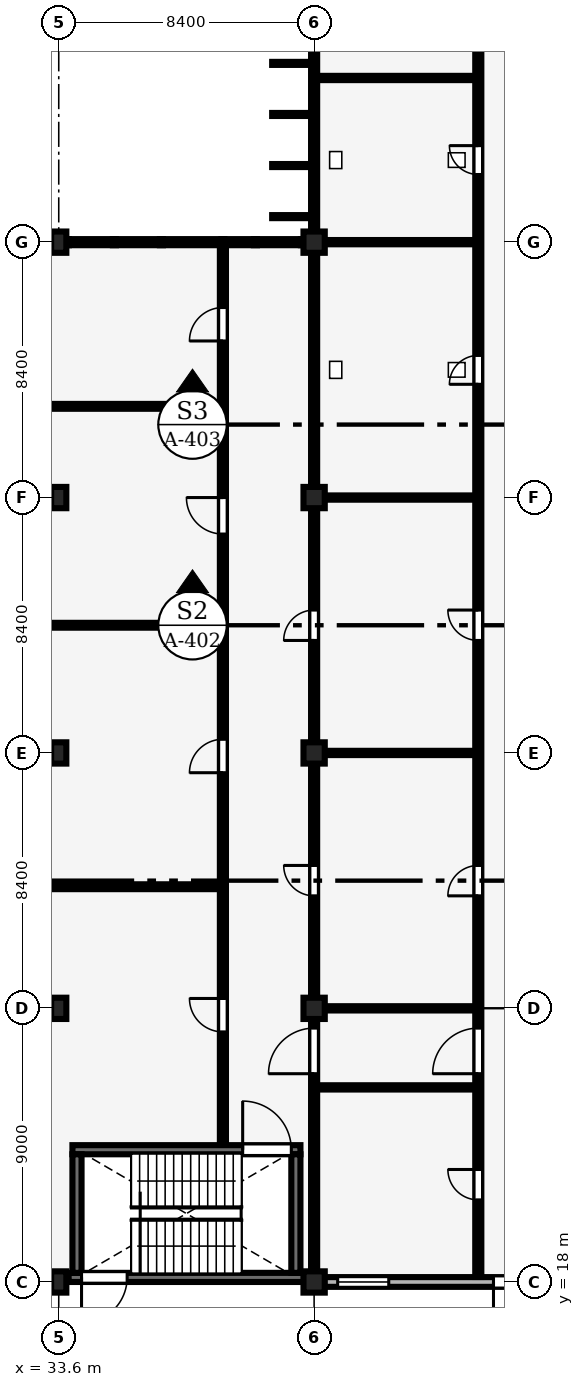
"""IFC4 building model, lengths in metres.
Left out: names, types, materials, properties, quantities, classifications, styles, units other than length and angle.
Written with IfcOpenShell. Run it as: python <this file> out.ifc"""

import sys

from ifc_helpers import new_model, si_unit, direction, frame, frame_2d, origin, origin_2d, place, context, subcontext, project, spatial, rectangle, extrude, element, fill, save


model = new_model("IFC4")
c1 = context("Model", 3, precision=1e-05, world=origin(), true_north=direction((0.0, 1.0)))
c2 = subcontext(c1, "Body", "Model", "MODEL_VIEW")
j1 = project(units=[si_unit("LENGTHUNIT", "METRE"), si_unit("PLANEANGLEUNIT", "RADIAN")], contexts=[c1])
p1 = place(None, origin())
s1 = spatial("IfcSite", under=j1, at=p1, CompositionType="ELEMENT")
p2 = place(p1, origin())
s2 = spatial("IfcBuilding", under=s1, at=p2, CompositionType="ELEMENT")
p3 = place(p2, origin())
s3 = spatial("IfcBuildingStorey", under=s2, at=p3, CompositionType="ELEMENT", Elevation=0.0)
for number, where, z_axis, x_axis in (
    (1, (33.6, 18.0, 0.0), (0.0, 0.0, 1.0), (1.0, 0.0, 0.0)),
    (2, (33.6, 27.0, 0.0), (0.0, 0.0, 1.0), (1.0, 0.0, 0.0)),
    (3, (33.6, 35.4, 0.0), (0.0, 0.0, 1.0), (1.0, 0.0, 0.0)),
    (4, (33.6, 43.8, 0.0), (0.0, 0.0, 1.0), (1.0, 0.0, 0.0)),
    (5, (33.6, 52.2, 0.0), (0.0, 0.0, 1.0), (1.0, 0.0, 0.0)),
):
    element("IfcColumn", number, at=place(p3, frame(where, z_axis=z_axis, x_axis=x_axis)), inside=s3, PredefinedType="COLUMN", context=c2, shape_type="SweptSolid", body=[
        extrude(rectangle(XDim=0.5, YDim=0.7, at=origin_2d()), origin(), (0.0, 0.0, 1.0), 4.8),
    ])
for number, where, z_axis, x_axis in (
    (6, (42.0, 18.0, 0.0), (0.0, 0.0, 1.0), (1.0, 0.0, 0.0)),
    (7, (42.0, 27.0, 0.0), (0.0, 0.0, 1.0), (1.0, 0.0, 0.0)),
    (8, (42.0, 35.4, 0.0), (0.0, 0.0, 1.0), (1.0, 0.0, 0.0)),
    (9, (42.0, 43.8, 0.0), (0.0, 0.0, 1.0), (1.0, 0.0, 0.0)),
    (10, (42.0, 52.2, 0.0), (0.0, 0.0, 1.0), (1.0, 0.0, 0.0)),
):
    element("IfcColumn", number, at=place(p3, frame(where, z_axis=z_axis, x_axis=x_axis)), inside=s3, PredefinedType="COLUMN", context=c2, shape_type="SweptSolid", body=[
        extrude(rectangle(XDim=0.7, YDim=0.7, at=origin_2d()), origin(), (0.0, 0.0, 1.0), 4.8),
    ])
p4 = place(p3, frame((42.325, 18.0, 0.0), z_axis=(0.0, 0.0, 1.0), x_axis=(1.0, 0.0, 0.0)))
e11 = element("IfcWall", 11, at=p4, inside=s3, PredefinedType="SOLIDWALL", context=c2, shape_type="SweptSolid", body=[
    extrude(rectangle(XDim=7.75, YDim=0.32, at=frame_2d((3.875, 0.0))), origin(), (0.0, 0.0, 1.0), 3.73),
])
p5 = place(p4, frame((7.375, 0.0, 0.0), z_axis=(0.0, 0.0, 1.0), x_axis=(-1.0, 0.0, 0.0)))
e12 = element("IfcOpeningElement", 12, at=p5, cuts=e11, PredefinedType="OPENING", context=c2, shape_type="SweptSolid", body=[
    extrude(rectangle(XDim=1.8, YDim=2.35, at=frame_2d((0.9, 1.175))), frame((0.0, 0.17, 0.0), z_axis=(0.0, -1.0, 0.0), x_axis=(1.0, 0.0, 0.0)), (0.0, 0.0, 1.0), 0.34),
])
p6 = place(p4, frame((0.45, 0.0, 0.95)))
e13 = element("IfcOpeningElement", 13, at=p6, cuts=e11, PredefinedType="OPENING", context=c2, shape_type="SweptSolid", body=[
    extrude(rectangle(XDim=1.68, YDim=1.8, at=frame_2d((0.84, 0.9))), frame((0.0, 0.17, 0.0), z_axis=(0.0, -1.0, 0.0), x_axis=(1.0, 0.0, 0.0)), (0.0, 0.0, 1.0), 0.34),
])
p7 = place(p3, frame((33.925, 18.15, 0.0), z_axis=(0.0, 0.0, 1.0), x_axis=(1.0, 0.0, 0.0)))
e14 = element("IfcWall", 14, at=p7, inside=s3, PredefinedType="SHEAR", context=c2, shape_type="SweptSolid", body=[
    extrude(rectangle(XDim=7.75, YDim=0.3, at=frame_2d((3.875, 0.0))), origin(), (0.0, 0.0, 1.0), 4.625),
])
p8 = place(p7, frame((1.925, 0.0, 0.0), z_axis=(0.0, 0.0, 1.0), x_axis=(-1.0, 0.0, 0.0)))
e15 = element("IfcOpeningElement", 15, at=p8, cuts=e14, PredefinedType="OPENING", context=c2, shape_type="SweptSolid", body=[
    extrude(rectangle(XDim=1.5, YDim=2.2, at=frame_2d((0.75, 1.1))), frame((0.0, 0.16, 0.0), z_axis=(0.0, -1.0, 0.0), x_axis=(1.0, 0.0, 0.0)), (0.0, 0.0, 1.0), 0.32),
])
p9 = place(p3, frame((34.05, 22.35, 0.0), z_axis=(0.0, 0.0, 1.0), x_axis=(1.0, 0.0, 0.0)))
e16 = element("IfcWall", 16, at=p9, inside=s3, PredefinedType="SHEAR", context=c2, shape_type="SweptSolid", body=[
    extrude(rectangle(XDim=7.5, YDim=0.3, at=frame_2d((3.75, 0.0))), origin(), (0.0, 0.0, 1.0), 4.625),
])
p10 = place(p9, frame((5.6, 0.0, 0.0)))
e17 = element("IfcOpeningElement", 17, at=p10, cuts=e16, PredefinedType="OPENING", context=c2, shape_type="SweptSolid", body=[
    extrude(rectangle(XDim=1.6, YDim=2.2, at=frame_2d((0.8, 1.1))), frame((0.0, 0.16, 0.0), z_axis=(0.0, -1.0, 0.0), x_axis=(1.0, 0.0, 0.0)), (0.0, 0.0, 1.0), 0.32),
])
for number, where, z_axis, x_axis in (
    (18, (34.2, 18.3, 0.0), (0.0, 0.0, 1.0), (0.0, 1.0, 0.0)),
    (19, (41.4, 18.3, 0.0), (0.0, 0.0, 1.0), (0.0, 1.0, 0.0)),
):
    element("IfcWall", number, at=place(p3, frame(where, z_axis=z_axis, x_axis=x_axis)), inside=s3, PredefinedType="SHEAR", context=c2, shape_type="SweptSolid", body=[
        extrude(rectangle(XDim=3.9, YDim=0.3, at=frame_2d((1.95, 0.0))), origin(), (0.0, 0.0, 1.0), 4.625),
    ])
for number, where, z_axis, x_axis in (
    (20, (25.21, 31.0, 0.0), (0.0, 0.0, 1.0), (1.0, 0.0, 0.0)),
    (21, (25.21, 39.6, 0.0), (0.0, 0.0, 1.0), (1.0, 0.0, 0.0)),
):
    element("IfcWall", number, at=place(p3, frame(where, z_axis=z_axis, x_axis=x_axis)), inside=s3, PredefinedType="PARTITIONING", context=c2, shape_type="SweptSolid", body=[
        extrude(rectangle(XDim=13.685, YDim=0.16, at=frame_2d((6.843, 0.0))), origin(), (0.0, 0.0, 1.0), 4.5),
    ])
p11 = place(p3, frame((25.21, 46.8, 0.0), z_axis=(0.0, 0.0, 1.0), x_axis=(1.0, 0.0, 0.0)))
e22 = element("IfcWall", 22, at=p11, inside=s3, PredefinedType="PARTITIONING", context=c2, shape_type="SweptSolid", body=[
    extrude(rectangle(XDim=13.685, YDim=0.16, at=frame_2d((6.843, 0.0))), origin(), (0.0, 0.0, 1.0), 4.114),
])
p12 = place(p3, frame((39.0, 22.56, 0.0), z_axis=(0.0, 0.0, 1.0), x_axis=(0.0, 1.0, 0.0)))
e23 = element("IfcWall", 23, at=p12, inside=s3, PredefinedType="PARTITIONING", context=c2, shape_type="SweptSolid", body=[
    extrude(rectangle(XDim=29.535, YDim=0.2, at=frame_2d((14.768, 0.0))), origin(), (0.0, 0.0, 1.0), 4.5),
])
p13 = place(p12, frame((3.665, 0.0, 0.0)))
e24 = element("IfcOpeningElement", 24, at=p13, cuts=e23, PredefinedType="OPENING", context=c2, shape_type="SweptSolid", body=[
    extrude(rectangle(XDim=1.1, YDim=2.15, at=frame_2d((0.55, 1.075))), frame((0.0, 0.11, 0.0), z_axis=(0.0, -1.0, 0.0), x_axis=(1.0, 0.0, 0.0)), (0.0, 0.0, 1.0), 0.22),
])
p14 = place(p12, frame((12.19, 0.0, 0.0)))
e25 = element("IfcOpeningElement", 25, at=p14, cuts=e23, PredefinedType="OPENING", context=c2, shape_type="SweptSolid", body=[
    extrude(rectangle(XDim=1.1, YDim=2.15, at=frame_2d((0.55, 1.075))), frame((0.0, 0.11, 0.0), z_axis=(0.0, -1.0, 0.0), x_axis=(1.0, 0.0, 0.0)), (0.0, 0.0, 1.0), 0.22),
])
p15 = place(p12, frame((20.04, 0.0, 0.0)))
e26 = element("IfcOpeningElement", 26, at=p15, cuts=e23, PredefinedType="OPENING", context=c2, shape_type="SweptSolid", body=[
    extrude(rectangle(XDim=1.2, YDim=2.2, at=frame_2d((0.6, 1.1))), frame((0.0, 0.11, 0.0), z_axis=(0.0, -1.0, 0.0), x_axis=(1.0, 0.0, 0.0)), (0.0, 0.0, 1.0), 0.22),
])
p16 = place(p12, frame((26.39, 0.0, 0.0)))
e27 = element("IfcOpeningElement", 27, at=p16, cuts=e23, PredefinedType="OPENING", context=c2, shape_type="SweptSolid", body=[
    extrude(rectangle(XDim=1.1, YDim=2.15, at=frame_2d((0.55, 1.075))), frame((0.0, 0.11, 0.0), z_axis=(0.0, -1.0, 0.0), x_axis=(1.0, 0.0, 0.0)), (0.0, 0.0, 1.0), 0.22),
])
p17 = place(p3, frame((42.105, 24.4, 0.0), z_axis=(0.0, 0.0, 1.0), x_axis=(1.0, 0.0, 0.0)))
e28 = element("IfcWall", 28, at=p17, inside=s3, PredefinedType="PARTITIONING", context=c2, shape_type="SweptSolid", body=[
    extrude(rectangle(XDim=5.19, YDim=0.14, at=frame_2d((2.595, 0.0))), origin(), (0.0, 0.0, 1.0), 4.03),
])
p18 = place(p3, frame((42.105, 27.0, 0.0), z_axis=(0.0, 0.0, 1.0), x_axis=(1.0, 0.0, 0.0)))
e29 = element("IfcWall", 29, at=p18, inside=s3, PredefinedType="PARTITIONING", context=c2, shape_type="SweptSolid", body=[
    extrude(rectangle(XDim=5.19, YDim=0.14, at=frame_2d((2.595, 0.0))), origin(), (0.0, 0.0, 1.0), 3.83),
])
p19 = place(p3, frame((42.105, 35.4, 0.0), z_axis=(0.0, 0.0, 1.0), x_axis=(1.0, 0.0, 0.0)))
e30 = element("IfcWall", 30, at=p19, inside=s3, PredefinedType="PARTITIONING", context=c2, shape_type="SweptSolid", body=[
    extrude(rectangle(XDim=5.19, YDim=0.14, at=frame_2d((2.595, 0.0))), origin(), (0.0, 0.0, 1.0), 3.96),
])
p20 = place(p3, frame((42.105, 43.8, 0.0), z_axis=(0.0, 0.0, 1.0), x_axis=(1.0, 0.0, 0.0)))
e31 = element("IfcWall", 31, at=p20, inside=s3, PredefinedType="PARTITIONING", context=c2, shape_type="SweptSolid", body=[
    extrude(rectangle(XDim=5.19, YDim=0.14, at=frame_2d((2.595, 0.0))), origin(), (0.0, 0.0, 1.0), 3.71),
])
p21 = place(p3, frame((42.105, 52.2, 0.0), z_axis=(0.0, 0.0, 1.0), x_axis=(1.0, 0.0, 0.0)))
e32 = element("IfcWall", 32, at=p21, inside=s3, PredefinedType="PARTITIONING", context=c2, shape_type="SweptSolid", body=[
    extrude(rectangle(XDim=5.19, YDim=0.14, at=frame_2d((2.595, 0.0))), origin(), (0.0, 0.0, 1.0), 3.91),
])
p22 = place(p3, frame((42.105, 57.6, 0.0), z_axis=(0.0, 0.0, 1.0), x_axis=(1.0, 0.0, 0.0)))
e33 = element("IfcWall", 33, at=p22, inside=s3, PredefinedType="PARTITIONING", context=c2, shape_type="SweptSolid", body=[
    extrude(rectangle(XDim=5.19, YDim=0.14, at=frame_2d((2.595, 0.0))), origin(), (0.0, 0.0, 1.0), 4.11),
])
p23 = place(p3, frame((47.4, 18.165, 0.0), z_axis=(0.0, 0.0, 1.0), x_axis=(0.0, 1.0, 0.0)))
e34 = element("IfcWall", 34, at=p23, inside=s3, PredefinedType="PARTITIONING", context=c2, shape_type="SweptSolid", body=[
    extrude(rectangle(XDim=67.625, YDim=0.2, at=frame_2d((33.812, 0.0))), origin(), (0.0, 0.0, 1.0), 4.5),
])
p24 = place(p23, frame((2.535, 0.0, 0.0)))
e35 = element("IfcOpeningElement", 35, at=p24, cuts=e34, PredefinedType="OPENING", context=c2, shape_type="SweptSolid", body=[
    extrude(rectangle(XDim=1.0, YDim=2.25, at=frame_2d((0.5, 1.125))), frame((0.0, 0.11, 0.0), z_axis=(0.0, -1.0, 0.0), x_axis=(1.0, 0.0, 0.0)), (0.0, 0.0, 1.0), 0.22),
])
p25 = place(p23, frame((6.685, 0.0, 0.0)))
e36 = element("IfcOpeningElement", 36, at=p25, cuts=e34, PredefinedType="OPENING", context=c2, shape_type="SweptSolid", body=[
    extrude(rectangle(XDim=1.5, YDim=2.2, at=frame_2d((0.75, 1.1))), frame((0.0, 0.11, 0.0), z_axis=(0.0, -1.0, 0.0), x_axis=(1.0, 0.0, 0.0)), (0.0, 0.0, 1.0), 0.22),
])
p26 = place(p23, frame((12.535, 0.0, 0.0)))
e37 = element("IfcOpeningElement", 37, at=p26, cuts=e34, PredefinedType="OPENING", context=c2, shape_type="SweptSolid", body=[
    extrude(rectangle(XDim=1.0, YDim=2.15, at=frame_2d((0.5, 1.075))), frame((0.0, 0.11, 0.0), z_axis=(0.0, -1.0, 0.0), x_axis=(1.0, 0.0, 0.0)), (0.0, 0.0, 1.0), 0.22),
])
p27 = place(p23, frame((20.935, 0.0, 0.0)))
e38 = element("IfcOpeningElement", 38, at=p27, cuts=e34, PredefinedType="OPENING", context=c2, shape_type="SweptSolid", body=[
    extrude(rectangle(XDim=1.0, YDim=2.15, at=frame_2d((0.5, 1.075))), frame((0.0, 0.11, 0.0), z_axis=(0.0, -1.0, 0.0), x_axis=(1.0, 0.0, 0.0)), (0.0, 0.0, 1.0), 0.22),
])
p28 = place(p23, frame((29.36, 0.0, 0.0)))
e39 = element("IfcOpeningElement", 39, at=p28, cuts=e34, PredefinedType="OPENING", context=c2, shape_type="SweptSolid", body=[
    extrude(rectangle(XDim=0.95, YDim=2.2, at=frame_2d((0.475, 1.1))), frame((0.0, 0.11, 0.0), z_axis=(0.0, -1.0, 0.0), x_axis=(1.0, 0.0, 0.0)), (0.0, 0.0, 1.0), 0.22),
])
p29 = place(p23, frame((36.26, 0.0, 0.0)))
e40 = element("IfcOpeningElement", 40, at=p29, cuts=e34, PredefinedType="OPENING", context=c2, shape_type="SweptSolid", body=[
    extrude(rectangle(XDim=0.95, YDim=2.2, at=frame_2d((0.475, 1.1))), frame((0.0, 0.11, 0.0), z_axis=(0.0, -1.0, 0.0), x_axis=(1.0, 0.0, 0.0)), (0.0, 0.0, 1.0), 0.22),
])
p30 = place(p23, frame((41.06, 0.0, 0.0)))
e41 = element("IfcOpeningElement", 41, at=p30, cuts=e34, PredefinedType="OPENING", context=c2, shape_type="SweptSolid", body=[
    extrude(rectangle(XDim=0.95, YDim=2.1, at=frame_2d((0.475, 1.05))), frame((0.0, 0.11, 0.0), z_axis=(0.0, -1.0, 0.0), x_axis=(1.0, 0.0, 0.0)), (0.0, 0.0, 1.0), 0.22),
])
p31 = place(p23, frame((49.635, 0.0, 0.0)))
e42 = element("IfcOpeningElement", 42, at=p31, cuts=e34, PredefinedType="OPENING", context=c2, shape_type="SweptSolid", body=[
    extrude(rectangle(XDim=1.2, YDim=2.2, at=frame_2d((0.6, 1.1))), frame((0.0, 0.11, 0.0), z_axis=(0.0, -1.0, 0.0), x_axis=(1.0, 0.0, 0.0)), (0.0, 0.0, 1.0), 0.22),
])
p32 = place(p23, frame((61.735, 0.0, 0.0)))
e43 = element("IfcOpeningElement", 43, at=p32, cuts=e34, PredefinedType="OPENING", context=c2, shape_type="SweptSolid", body=[
    extrude(rectangle(XDim=1.0, YDim=2.25, at=frame_2d((0.5, 1.125))), frame((0.0, 0.11, 0.0), z_axis=(0.0, -1.0, 0.0), x_axis=(1.0, 0.0, 0.0)), (0.0, 0.0, 1.0), 0.22),
])
p33 = place(p3, frame((42.0, 18.165, 0.0), z_axis=(0.0, 0.0, 1.0), x_axis=(0.0, 1.0, 0.0)))
e44 = element("IfcWall", 44, at=p33, inside=s3, PredefinedType="PARTITIONING", context=c2, shape_type="SweptSolid", body=[
    extrude(rectangle(XDim=8.475, YDim=0.2, at=frame_2d((4.237, 0.0))), origin(), (0.0, 0.0, 1.0), 3.872),
])
p34 = place(p33, frame((6.685, 0.0, 0.0)))
e45 = element("IfcOpeningElement", 45, at=p34, cuts=e44, PredefinedType="OPENING", context=c2, shape_type="SweptSolid", body=[
    extrude(rectangle(XDim=1.5, YDim=2.2, at=frame_2d((0.75, 1.1))), frame((0.0, 0.11, 0.0), z_axis=(0.0, -1.0, 0.0), x_axis=(1.0, 0.0, 0.0)), (0.0, 0.0, 1.0), 0.22),
])
p35 = place(p3, frame((42.0, 27.36, 0.0), z_axis=(0.0, 0.0, 1.0), x_axis=(0.0, 1.0, 0.0)))
e46 = element("IfcWall", 46, at=p35, inside=s3, PredefinedType="PARTITIONING", context=c2, shape_type="SweptSolid", body=[
    extrude(rectangle(XDim=7.68, YDim=0.2, at=frame_2d((3.84, 0.0))), origin(), (0.0, 0.0, 1.0), 3.912),
])
p36 = place(p35, frame((3.34, 0.0, 0.0)))
e47 = element("IfcOpeningElement", 47, at=p36, cuts=e46, PredefinedType="OPENING", context=c2, shape_type="SweptSolid", body=[
    extrude(rectangle(XDim=1.0, YDim=2.15, at=frame_2d((0.5, 1.075))), frame((0.0, 0.11, 0.0), z_axis=(0.0, -1.0, 0.0), x_axis=(1.0, 0.0, 0.0)), (0.0, 0.0, 1.0), 0.22),
])
p37 = place(p3, frame((42.0, 35.76, 0.0), z_axis=(0.0, 0.0, 1.0), x_axis=(0.0, 1.0, 0.0)))
e48 = element("IfcWall", 48, at=p37, inside=s3, PredefinedType="PARTITIONING", context=c2, shape_type="SweptSolid", body=[
    extrude(rectangle(XDim=7.68, YDim=0.2, at=frame_2d((3.84, 0.0))), origin(), (0.0, 0.0, 1.0), 3.912),
])
p38 = place(p37, frame((3.34, 0.0, 0.0)))
e49 = element("IfcOpeningElement", 49, at=p38, cuts=e48, PredefinedType="OPENING", context=c2, shape_type="SweptSolid", body=[
    extrude(rectangle(XDim=1.0, YDim=2.15, at=frame_2d((0.5, 1.075))), frame((0.0, 0.11, 0.0), z_axis=(0.0, -1.0, 0.0), x_axis=(1.0, 0.0, 0.0)), (0.0, 0.0, 1.0), 0.22),
])
p39 = place(p3, frame((42.0, 44.16, 0.0), z_axis=(0.0, 0.0, 1.0), x_axis=(0.0, 1.0, 0.0)))
e50 = element("IfcWall", 50, at=p39, inside=s3, PredefinedType="PARTITIONING", context=c2, shape_type="SweptSolid", body=[
    extrude(rectangle(XDim=7.935, YDim=0.2, at=frame_2d((3.968, 0.0))), origin(), (0.0, 0.0, 1.0), 3.912),
])
p40 = place(p5, origin())
e51 = element("IfcDoor", 51, at=p40, inside=s3, OperationType="DOUBLE_DOOR_SINGLE_SWING", PredefinedType="DOOR", context=c2, shape_type="SweptSolid", body=[
    extrude(rectangle(XDim=1.8, YDim=2.35, at=frame_2d((0.9, 1.175))), frame((0.0, 0.025, 0.0), z_axis=(0.0, -1.0, 0.0), x_axis=(1.0, 0.0, 0.0)), (0.0, 0.0, 1.0), 0.05),
])
fill(e12, e51)
p41 = place(p6, origin())
e52 = element("IfcWindow", 52, at=p41, inside=s3, PartitioningType="SINGLE_PANEL", PredefinedType="WINDOW", context=c2, shape_type="SweptSolid", body=[
    extrude(rectangle(XDim=1.68, YDim=1.8, at=frame_2d((0.84, 0.9))), frame((0.0, 0.03, 0.0), z_axis=(0.0, -1.0, 0.0), x_axis=(1.0, 0.0, 0.0)), (0.0, 0.0, 1.0), 0.06),
])
fill(e13, e52)
p42 = place(p8, origin())
e53 = element("IfcDoor", 53, at=p42, inside=s3, OperationType="DOUBLE_DOOR_SINGLE_SWING", PredefinedType="DOOR", context=c2, shape_type="SweptSolid", body=[
    extrude(rectangle(XDim=1.5, YDim=2.2, at=frame_2d((0.75, 1.1))), frame((0.0, 0.025, 0.0), z_axis=(0.0, -1.0, 0.0), x_axis=(1.0, 0.0, 0.0)), (0.0, 0.0, 1.0), 0.05),
])
fill(e15, e53)
p43 = place(p10, origin())
e54 = element("IfcDoor", 54, at=p43, inside=s3, OperationType="DOUBLE_DOOR_SINGLE_SWING", PredefinedType="DOOR", context=c2, shape_type="SweptSolid", body=[
    extrude(rectangle(XDim=1.6, YDim=2.2, at=frame_2d((0.8, 1.1))), frame((0.0, 0.025, 0.0), z_axis=(0.0, -1.0, 0.0), x_axis=(1.0, 0.0, 0.0)), (0.0, 0.0, 1.0), 0.05),
])
fill(e17, e54)
p44 = place(p13, origin())
e55 = element("IfcDoor", 55, at=p44, inside=s3, OperationType="SINGLE_SWING_RIGHT", PredefinedType="DOOR", context=c2, shape_type="SweptSolid", body=[
    extrude(rectangle(XDim=1.1, YDim=2.15, at=frame_2d((0.55, 1.075))), frame((0.0, 0.025, 0.0), z_axis=(0.0, -1.0, 0.0), x_axis=(1.0, 0.0, 0.0)), (0.0, 0.0, 1.0), 0.05),
])
fill(e24, e55)
p45 = place(p14, origin())
e56 = element("IfcDoor", 56, at=p45, inside=s3, OperationType="SINGLE_SWING_LEFT", PredefinedType="DOOR", context=c2, shape_type="SweptSolid", body=[
    extrude(rectangle(XDim=1.1, YDim=2.15, at=frame_2d((0.55, 1.075))), frame((0.0, 0.025, 0.0), z_axis=(0.0, -1.0, 0.0), x_axis=(1.0, 0.0, 0.0)), (0.0, 0.0, 1.0), 0.05),
])
fill(e25, e56)
p46 = place(p15, origin())
e57 = element("IfcDoor", 57, at=p46, inside=s3, OperationType="SINGLE_SWING_RIGHT", PredefinedType="DOOR", context=c2, shape_type="SweptSolid", body=[
    extrude(rectangle(XDim=1.2, YDim=2.2, at=frame_2d((0.6, 1.1))), frame((0.0, 0.025, 0.0), z_axis=(0.0, -1.0, 0.0), x_axis=(1.0, 0.0, 0.0)), (0.0, 0.0, 1.0), 0.05),
])
fill(e26, e57)
p47 = place(p16, origin())
e58 = element("IfcDoor", 58, at=p47, inside=s3, OperationType="SINGLE_SWING_LEFT", PredefinedType="DOOR", context=c2, shape_type="SweptSolid", body=[
    extrude(rectangle(XDim=1.1, YDim=2.15, at=frame_2d((0.55, 1.075))), frame((0.0, 0.025, 0.0), z_axis=(0.0, -1.0, 0.0), x_axis=(1.0, 0.0, 0.0)), (0.0, 0.0, 1.0), 0.05),
])
fill(e27, e58)
p48 = place(p24, origin())
e59 = element("IfcDoor", 59, at=p48, inside=s3, OperationType="SINGLE_SWING_RIGHT", PredefinedType="DOOR", context=c2, shape_type="SweptSolid", body=[
    extrude(rectangle(XDim=1.0, YDim=2.25, at=frame_2d((0.5, 1.125))), frame((0.0, 0.025, 0.0), z_axis=(0.0, -1.0, 0.0), x_axis=(1.0, 0.0, 0.0)), (0.0, 0.0, 1.0), 0.05),
])
fill(e35, e59)
p49 = place(p25, origin())
e60 = element("IfcDoor", 60, at=p49, inside=s3, OperationType="DOUBLE_DOOR_SINGLE_SWING", PredefinedType="DOOR", context=c2, shape_type="SweptSolid", body=[
    extrude(rectangle(XDim=1.5, YDim=2.2, at=frame_2d((0.75, 1.1))), frame((0.0, 0.025, 0.0), z_axis=(0.0, -1.0, 0.0), x_axis=(1.0, 0.0, 0.0)), (0.0, 0.0, 1.0), 0.05),
])
fill(e36, e60)
p50 = place(p26, origin())
e61 = element("IfcDoor", 61, at=p50, inside=s3, OperationType="SINGLE_SWING_LEFT", PredefinedType="DOOR", context=c2, shape_type="SweptSolid", body=[
    extrude(rectangle(XDim=1.0, YDim=2.15, at=frame_2d((0.5, 1.075))), frame((0.0, 0.025, 0.0), z_axis=(0.0, -1.0, 0.0), x_axis=(1.0, 0.0, 0.0)), (0.0, 0.0, 1.0), 0.05),
])
fill(e37, e61)
p51 = place(p27, origin())
e62 = element("IfcDoor", 62, at=p51, inside=s3, OperationType="SINGLE_SWING_RIGHT", PredefinedType="DOOR", context=c2, shape_type="SweptSolid", body=[
    extrude(rectangle(XDim=1.0, YDim=2.15, at=frame_2d((0.5, 1.075))), frame((0.0, 0.025, 0.0), z_axis=(0.0, -1.0, 0.0), x_axis=(1.0, 0.0, 0.0)), (0.0, 0.0, 1.0), 0.05),
])
fill(e38, e62)
p52 = place(p28, origin())
e63 = element("IfcDoor", 63, at=p52, inside=s3, OperationType="SINGLE_SWING_LEFT", PredefinedType="DOOR", context=c2, shape_type="SweptSolid", body=[
    extrude(rectangle(XDim=0.95, YDim=2.2, at=frame_2d((0.475, 1.1))), frame((0.0, 0.025, 0.0), z_axis=(0.0, -1.0, 0.0), x_axis=(1.0, 0.0, 0.0)), (0.0, 0.0, 1.0), 0.05),
])
fill(e39, e63)
p53 = place(p29, origin())
e64 = element("IfcDoor", 64, at=p53, inside=s3, OperationType="SINGLE_SWING_RIGHT", PredefinedType="DOOR", context=c2, shape_type="SweptSolid", body=[
    extrude(rectangle(XDim=0.95, YDim=2.2, at=frame_2d((0.475, 1.1))), frame((0.0, 0.025, 0.0), z_axis=(0.0, -1.0, 0.0), x_axis=(1.0, 0.0, 0.0)), (0.0, 0.0, 1.0), 0.05),
])
fill(e40, e64)
p54 = place(p34, origin())
e65 = element("IfcDoor", 65, at=p54, inside=s3, OperationType="DOUBLE_DOOR_SINGLE_SWING", PredefinedType="DOOR", context=c2, shape_type="SweptSolid", body=[
    extrude(rectangle(XDim=1.5, YDim=2.2, at=frame_2d((0.75, 1.1))), frame((0.0, 0.025, 0.0), z_axis=(0.0, -1.0, 0.0), x_axis=(1.0, 0.0, 0.0)), (0.0, 0.0, 1.0), 0.05),
])
fill(e45, e65)
p55 = place(p36, origin())
e66 = element("IfcDoor", 66, at=p55, inside=s3, OperationType="SINGLE_SWING_RIGHT", PredefinedType="DOOR", context=c2, shape_type="SweptSolid", body=[
    extrude(rectangle(XDim=1.0, YDim=2.15, at=frame_2d((0.5, 1.075))), frame((0.0, 0.025, 0.0), z_axis=(0.0, -1.0, 0.0), x_axis=(1.0, 0.0, 0.0)), (0.0, 0.0, 1.0), 0.05),
])
fill(e47, e66)
p56 = place(p38, origin())
e67 = element("IfcDoor", 67, at=p56, inside=s3, OperationType="SINGLE_SWING_LEFT", PredefinedType="DOOR", context=c2, shape_type="SweptSolid", body=[
    extrude(rectangle(XDim=1.0, YDim=2.15, at=frame_2d((0.5, 1.075))), frame((0.0, 0.025, 0.0), z_axis=(0.0, -1.0, 0.0), x_axis=(1.0, 0.0, 0.0)), (0.0, 0.0, 1.0), 0.05),
])
fill(e49, e67)
save(model, sys.argv[1])
